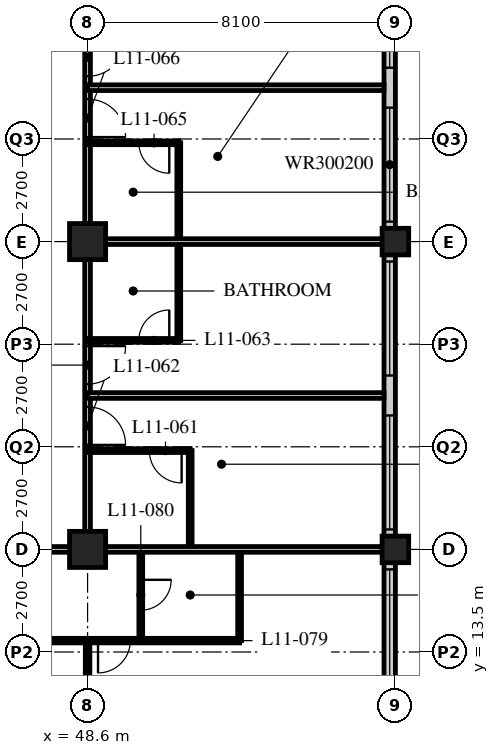
"""IFC4 building model, lengths in metres.
Left out: names, types, materials, properties, quantities, classifications, styles, units other than length and angle.
Written with IfcOpenShell. Run it as: python <this file> out.ifc"""

import sys

from ifc_helpers import new_model, si_unit, direction, frame, frame_2d, origin, origin_2d, place, context, subcontext, project, spatial, rectangle, hollow_rectangle, extrude, element, fill, save


model = new_model("IFC4")
c1 = context("Model", 3, precision=1e-05, world=origin(), true_north=direction((0.0, 1.0)))
c2 = subcontext(c1, "Body", "Model", "MODEL_VIEW")
j1 = project(units=[si_unit("LENGTHUNIT", "METRE"), si_unit("PLANEANGLEUNIT", "RADIAN")], contexts=[c1])
p1 = place(None, origin())
s1 = spatial("IfcSite", under=j1, at=p1, CompositionType="ELEMENT")
p2 = place(p1, origin())
s2 = spatial("IfcBuilding", under=s1, at=p2, CompositionType="ELEMENT")
p3 = place(p2, frame((0.0, 0.0, 50.0)))
s3 = spatial("IfcBuildingStorey", under=s2, at=p3, CompositionType="ELEMENT", Elevation=50.0)
for number, where, z_axis, x_axis in (
    (1, (48.6, 16.2, 0.0), (0.0, 0.0, 1.0), (1.0, 0.0, 0.0)),
    (2, (48.6, 24.3, 0.0), (0.0, 0.0, 1.0), (1.0, 0.0, 0.0)),
):
    element("IfcColumn", number, at=place(p3, frame(where, z_axis=z_axis, x_axis=x_axis)), inside=s3, PredefinedType="COLUMN", context=c2, shape_type="SweptSolid", body=[
        extrude(hollow_rectangle(XDim=0.95, YDim=0.95, WallThickness=0.095, at=origin_2d()), origin(), (0.0, 0.0, 1.0), 3.4),
    ])
for number, where, z_axis, x_axis in (
    (3, (56.7, 16.2, 0.0), (0.0, 0.0, 1.0), (1.0, 0.0, 0.0)),
    (4, (56.7, 24.3, 0.0), (0.0, 0.0, 1.0), (1.0, 0.0, 0.0)),
):
    element("IfcColumn", number, at=place(p3, frame(where, z_axis=z_axis, x_axis=x_axis)), inside=s3, PredefinedType="COLUMN", context=c2, shape_type="SweptSolid", body=[
        extrude(hollow_rectangle(XDim=0.7, YDim=0.7, WallThickness=0.06, at=origin_2d()), origin(), (0.0, 0.0, 1.0), 3.4),
    ])
p4 = place(p3, frame((56.55, 8.4, 0.0), z_axis=(0.0, 0.0, 1.0), x_axis=(0.0, 1.0, 0.0)))
e5 = element("IfcWall", 5, at=p4, inside=s3, PredefinedType="SOLIDWALL", context=c2, shape_type="SweptSolid", body=[
    extrude(rectangle(XDim=32.1, YDim=0.3, at=frame_2d((16.05, 0.0))), origin(), (0.0, 0.0, 1.0), 3.19),
])
p5 = place(p4, frame((0.225, 0.0, 0.9)))
e6 = element("IfcOpeningElement", 6, at=p5, cuts=e5, PredefinedType="OPENING", context=c2, shape_type="SweptSolid", body=[
    extrude(rectangle(XDim=3.0, YDim=2.0, at=frame_2d((1.5, 1.0))), frame((0.0, 0.16, 0.0), z_axis=(0.0, -1.0, 0.0), x_axis=(1.0, 0.0, 0.0)), (0.0, 0.0, 1.0), 0.32),
])
p6 = place(p4, frame((4.275, 0.0, 0.9)))
e7 = element("IfcOpeningElement", 7, at=p6, cuts=e5, PredefinedType="OPENING", context=c2, shape_type="SweptSolid", body=[
    extrude(rectangle(XDim=3.0, YDim=2.0, at=frame_2d((1.5, 1.0))), frame((0.0, 0.16, 0.0), z_axis=(0.0, -1.0, 0.0), x_axis=(1.0, 0.0, 0.0)), (0.0, 0.0, 1.0), 0.32),
])
p7 = place(p4, frame((8.325, 0.0, 0.9)))
e8 = element("IfcOpeningElement", 8, at=p7, cuts=e5, PredefinedType="OPENING", context=c2, shape_type="SweptSolid", body=[
    extrude(rectangle(XDim=3.0, YDim=2.0, at=frame_2d((1.5, 1.0))), frame((0.0, 0.16, 0.0), z_axis=(0.0, -1.0, 0.0), x_axis=(1.0, 0.0, 0.0)), (0.0, 0.0, 1.0), 0.32),
])
p8 = place(p4, frame((12.375, 0.0, 0.9)))
e9 = element("IfcOpeningElement", 9, at=p8, cuts=e5, PredefinedType="OPENING", context=c2, shape_type="SweptSolid", body=[
    extrude(rectangle(XDim=3.0, YDim=2.0, at=frame_2d((1.5, 1.0))), frame((0.0, 0.16, 0.0), z_axis=(0.0, -1.0, 0.0), x_axis=(1.0, 0.0, 0.0)), (0.0, 0.0, 1.0), 0.32),
])
p9 = place(p4, frame((16.425, 0.0, 0.9)))
e10 = element("IfcOpeningElement", 10, at=p9, cuts=e5, PredefinedType="OPENING", context=c2, shape_type="SweptSolid", body=[
    extrude(rectangle(XDim=3.0, YDim=2.0, at=frame_2d((1.5, 1.0))), frame((0.0, 0.16, 0.0), z_axis=(0.0, -1.0, 0.0), x_axis=(1.0, 0.0, 0.0)), (0.0, 0.0, 1.0), 0.32),
])
p10 = place(p4, frame((20.475, 0.0, 0.9)))
e11 = element("IfcOpeningElement", 11, at=p10, cuts=e5, PredefinedType="OPENING", context=c2, shape_type="SweptSolid", body=[
    extrude(rectangle(XDim=3.0, YDim=2.0, at=frame_2d((1.5, 1.0))), frame((0.0, 0.16, 0.0), z_axis=(0.0, -1.0, 0.0), x_axis=(1.0, 0.0, 0.0)), (0.0, 0.0, 1.0), 0.32),
])
p11 = place(p4, frame((24.525, 0.0, 0.9)))
e12 = element("IfcOpeningElement", 12, at=p11, cuts=e5, PredefinedType="OPENING", context=c2, shape_type="SweptSolid", body=[
    extrude(rectangle(XDim=3.0, YDim=2.0, at=frame_2d((1.5, 1.0))), frame((0.0, 0.16, 0.0), z_axis=(0.0, -1.0, 0.0), x_axis=(1.0, 0.0, 0.0)), (0.0, 0.0, 1.0), 0.32),
])
p12 = place(p4, frame((28.575, 0.0, 0.9)))
e13 = element("IfcOpeningElement", 13, at=p12, cuts=e5, PredefinedType="OPENING", context=c2, shape_type="SweptSolid", body=[
    extrude(rectangle(XDim=3.0, YDim=2.0, at=frame_2d((1.5, 1.0))), frame((0.0, 0.16, 0.0), z_axis=(0.0, -1.0, 0.0), x_axis=(1.0, 0.0, 0.0)), (0.0, 0.0, 1.0), 0.32),
])
p13 = place(p3, frame((8.1, 16.2, 0.0), z_axis=(0.0, 0.0, 1.0), x_axis=(1.0, 0.0, 0.0)))
e14 = element("IfcWall", 14, at=p13, inside=s3, PredefinedType="PARTITIONING", context=c2, shape_type="SweptSolid", body=[
    extrude(rectangle(XDim=40.5, YDim=0.15, at=frame_2d((20.25, 0.0))), origin(), (0.0, 0.0, 1.0), 2.578),
])
p14 = place(p13, frame((4.35, 0.0, 0.0)))
e15 = element("IfcOpeningElement", 15, at=p14, cuts=e14, PredefinedType="OPENING", context=c2, shape_type="SweptSolid", body=[
    extrude(rectangle(XDim=1.0, YDim=2.1, at=frame_2d((0.5, 1.05))), frame((0.0, 0.085, 0.0), z_axis=(0.0, -1.0, 0.0), x_axis=(1.0, 0.0, 0.0)), (0.0, 0.0, 1.0), 0.17),
])
p15 = place(p13, frame((10.85, 0.0, 0.0)))
e16 = element("IfcOpeningElement", 16, at=p15, cuts=e14, PredefinedType="OPENING", context=c2, shape_type="SweptSolid", body=[
    extrude(rectangle(XDim=1.0, YDim=2.1, at=frame_2d((0.5, 1.05))), frame((0.0, 0.085, 0.0), z_axis=(0.0, -1.0, 0.0), x_axis=(1.0, 0.0, 0.0)), (0.0, 0.0, 1.0), 0.17),
])
p16 = place(p13, frame((12.75, 0.0, 0.0)))
e17 = element("IfcOpeningElement", 17, at=p16, cuts=e14, PredefinedType="OPENING", context=c2, shape_type="SweptSolid", body=[
    extrude(rectangle(XDim=1.0, YDim=2.1, at=frame_2d((0.5, 1.05))), frame((0.0, 0.085, 0.0), z_axis=(0.0, -1.0, 0.0), x_axis=(1.0, 0.0, 0.0)), (0.0, 0.0, 1.0), 0.17),
])
p17 = place(p13, frame((18.95, 0.0, 0.0)))
e18 = element("IfcOpeningElement", 18, at=p17, cuts=e14, PredefinedType="OPENING", context=c2, shape_type="SweptSolid", body=[
    extrude(rectangle(XDim=1.0, YDim=2.1, at=frame_2d((0.5, 1.05))), frame((0.0, 0.085, 0.0), z_axis=(0.0, -1.0, 0.0), x_axis=(1.0, 0.0, 0.0)), (0.0, 0.0, 1.0), 0.17),
])
p18 = place(p13, frame((20.55, 0.0, 0.0)))
e19 = element("IfcOpeningElement", 19, at=p18, cuts=e14, PredefinedType="OPENING", context=c2, shape_type="SweptSolid", body=[
    extrude(rectangle(XDim=1.0, YDim=2.1, at=frame_2d((0.5, 1.05))), frame((0.0, 0.085, 0.0), z_axis=(0.0, -1.0, 0.0), x_axis=(1.0, 0.0, 0.0)), (0.0, 0.0, 1.0), 0.17),
])
p19 = place(p13, frame((27.05, 0.0, 0.0)))
e20 = element("IfcOpeningElement", 20, at=p19, cuts=e14, PredefinedType="OPENING", context=c2, shape_type="SweptSolid", body=[
    extrude(rectangle(XDim=1.0, YDim=2.1, at=frame_2d((0.5, 1.05))), frame((0.0, 0.085, 0.0), z_axis=(0.0, -1.0, 0.0), x_axis=(1.0, 0.0, 0.0)), (0.0, 0.0, 1.0), 0.17),
])
p20 = place(p13, frame((28.95, 0.0, 0.0)))
e21 = element("IfcOpeningElement", 21, at=p20, cuts=e14, PredefinedType="OPENING", context=c2, shape_type="SweptSolid", body=[
    extrude(rectangle(XDim=1.0, YDim=2.1, at=frame_2d((0.5, 1.05))), frame((0.0, 0.085, 0.0), z_axis=(0.0, -1.0, 0.0), x_axis=(1.0, 0.0, 0.0)), (0.0, 0.0, 1.0), 0.17),
])
p21 = place(p13, frame((34.85, 0.0, 0.0)))
e22 = element("IfcOpeningElement", 22, at=p21, cuts=e14, PredefinedType="OPENING", context=c2, shape_type="SweptSolid", body=[
    extrude(rectangle(XDim=1.0, YDim=2.1, at=frame_2d((0.5, 1.05))), frame((0.0, 0.085, 0.0), z_axis=(0.0, -1.0, 0.0), x_axis=(1.0, 0.0, 0.0)), (0.0, 0.0, 1.0), 0.17),
])
p22 = place(p13, frame((1.525, 0.0, 0.0)))
e23 = element("IfcOpeningElement", 23, at=p22, cuts=e14, PredefinedType="OPENING", context=c2, shape_type="SweptSolid", body=[
    extrude(rectangle(XDim=1.0, YDim=2.1, at=frame_2d((0.5, 1.05))), frame((0.0, 0.085, 0.0), z_axis=(0.0, -1.0, 0.0), x_axis=(1.0, 0.0, 0.0)), (0.0, 0.0, 1.0), 0.17),
])
p23 = place(p13, frame((37.975, 0.0, 0.0)))
e24 = element("IfcOpeningElement", 24, at=p23, cuts=e14, PredefinedType="OPENING", context=c2, shape_type="SweptSolid", body=[
    extrude(rectangle(XDim=1.0, YDim=2.1, at=frame_2d((0.5, 1.05))), frame((0.0, 0.085, 0.0), z_axis=(0.0, -1.0, 0.0), x_axis=(1.0, 0.0, 0.0)), (0.0, 0.0, 1.0), 0.17),
])
p24 = place(p3, frame((48.6, 16.2, 0.0), z_axis=(0.0, 0.0, 1.0), x_axis=(0.0, 1.0, 0.0)))
e25 = element("IfcWall", 25, at=p24, inside=s3, PredefinedType="PARTITIONING", context=c2, shape_type="SweptSolid", body=[
    extrude(rectangle(XDim=26.1, YDim=0.15, at=frame_2d((13.05, 0.0))), origin(), (0.0, 0.0, 1.0), 2.578),
])
p25 = place(p24, frame((2.75, 0.0, 0.0)))
e26 = element("IfcOpeningElement", 26, at=p25, cuts=e25, PredefinedType="OPENING", context=c2, shape_type="SweptSolid", body=[
    extrude(rectangle(XDim=1.0, YDim=2.1, at=frame_2d((0.5, 1.05))), frame((0.0, 0.085, 0.0), z_axis=(0.0, -1.0, 0.0), x_axis=(1.0, 0.0, 0.0)), (0.0, 0.0, 1.0), 0.17),
])
p26 = place(p24, frame((4.35, 0.0, 0.0)))
e27 = element("IfcOpeningElement", 27, at=p26, cuts=e25, PredefinedType="OPENING", context=c2, shape_type="SweptSolid", body=[
    extrude(rectangle(XDim=1.0, YDim=2.1, at=frame_2d((0.5, 1.05))), frame((0.0, 0.085, 0.0), z_axis=(0.0, -1.0, 0.0), x_axis=(1.0, 0.0, 0.0)), (0.0, 0.0, 1.0), 0.17),
])
p27 = place(p24, frame((10.85, 0.0, 0.0)))
e28 = element("IfcOpeningElement", 28, at=p27, cuts=e25, PredefinedType="OPENING", context=c2, shape_type="SweptSolid", body=[
    extrude(rectangle(XDim=1.0, YDim=2.1, at=frame_2d((0.5, 1.05))), frame((0.0, 0.085, 0.0), z_axis=(0.0, -1.0, 0.0), x_axis=(1.0, 0.0, 0.0)), (0.0, 0.0, 1.0), 0.17),
])
p28 = place(p24, frame((12.45, 0.0, 0.0)))
e29 = element("IfcOpeningElement", 29, at=p28, cuts=e25, PredefinedType="OPENING", context=c2, shape_type="SweptSolid", body=[
    extrude(rectangle(XDim=1.0, YDim=2.1, at=frame_2d((0.5, 1.05))), frame((0.0, 0.085, 0.0), z_axis=(0.0, -1.0, 0.0), x_axis=(1.0, 0.0, 0.0)), (0.0, 0.0, 1.0), 0.17),
])
p29 = place(p24, frame((18.65, 0.0, 0.0)))
e30 = element("IfcOpeningElement", 30, at=p29, cuts=e25, PredefinedType="OPENING", context=c2, shape_type="SweptSolid", body=[
    extrude(rectangle(XDim=1.0, YDim=2.1, at=frame_2d((0.5, 1.05))), frame((0.0, 0.085, 0.0), z_axis=(0.0, -1.0, 0.0), x_axis=(1.0, 0.0, 0.0)), (0.0, 0.0, 1.0), 0.17),
])
p30 = place(p24, frame((22.7, 0.0, 0.0)))
e31 = element("IfcOpeningElement", 31, at=p30, cuts=e25, PredefinedType="OPENING", context=c2, shape_type="SweptSolid", body=[
    extrude(rectangle(XDim=1.0, YDim=2.1, at=frame_2d((0.5, 1.05))), frame((0.0, 0.085, 0.0), z_axis=(0.0, -1.0, 0.0), x_axis=(1.0, 0.0, 0.0)), (0.0, 0.0, 1.0), 0.17),
])
p31 = place(p3, frame((51.3, 16.2, 0.0), z_axis=(0.0, 0.0, 1.0), x_axis=(0.0, 1.0, 0.0)))
e32 = element("IfcWall", 32, at=p31, inside=s3, PredefinedType="PARTITIONING", context=c2, shape_type="SweptSolid", body=[
    extrude(rectangle(XDim=2.6, YDim=0.1, at=frame_2d((1.3, 0.0))), origin(), (0.0, 0.0, 1.0), 3.19),
])
p32 = place(p3, frame((48.6, 18.8, 0.0), z_axis=(0.0, 0.0, 1.0), x_axis=(1.0, 0.0, 0.0)))
e33 = element("IfcWall", 33, at=p32, inside=s3, PredefinedType="PARTITIONING", context=c2, shape_type="SweptSolid", body=[
    extrude(rectangle(XDim=2.7, YDim=0.1, at=frame_2d((1.35, 0.0))), origin(), (0.0, 0.0, 1.0), 3.19),
])
p33 = place(p32, frame((1.625, 0.0, 0.0)))
e34 = element("IfcOpeningElement", 34, at=p33, cuts=e33, PredefinedType="OPENING", context=c2, shape_type="SweptSolid", body=[
    extrude(rectangle(XDim=0.85, YDim=2.1, at=frame_2d((0.425, 1.05))), frame((0.0, 0.06, 0.0), z_axis=(0.0, -1.0, 0.0), x_axis=(1.0, 0.0, 0.0)), (0.0, 0.0, 1.0), 0.12),
])
p34 = place(p3, frame((48.6, 20.25, 0.0), z_axis=(0.0, 0.0, 1.0), x_axis=(1.0, 0.0, 0.0)))
e35 = element("IfcWall", 35, at=p34, inside=s3, PredefinedType="PARTITIONING", context=c2, shape_type="SweptSolid", body=[
    extrude(rectangle(XDim=7.8, YDim=0.15, at=frame_2d((3.9, 0.0))), origin(), (0.0, 0.0, 1.0), 3.19),
])
p35 = place(p3, frame((51.0, 21.7, 0.0), z_axis=(0.0, 0.0, 1.0), x_axis=(0.0, 1.0, 0.0)))
e36 = element("IfcWall", 36, at=p35, inside=s3, PredefinedType="PARTITIONING", context=c2, shape_type="SweptSolid", body=[
    extrude(rectangle(XDim=5.2, YDim=0.1, at=frame_2d((2.6, 0.0))), origin(), (0.0, 0.0, 1.0), 3.19),
])
p36 = place(p3, frame((48.6, 21.7, 0.0), z_axis=(0.0, 0.0, 1.0), x_axis=(1.0, 0.0, 0.0)))
e37 = element("IfcWall", 37, at=p36, inside=s3, PredefinedType="PARTITIONING", context=c2, shape_type="SweptSolid", body=[
    extrude(rectangle(XDim=2.4, YDim=0.1, at=frame_2d((1.2, 0.0))), origin(), (0.0, 0.0, 1.0), 3.19),
])
p37 = place(p36, frame((1.35, 0.0, 0.0)))
e38 = element("IfcOpeningElement", 38, at=p37, cuts=e37, PredefinedType="OPENING", context=c2, shape_type="SweptSolid", body=[
    extrude(rectangle(XDim=0.8, YDim=2.1, at=frame_2d((0.4, 1.05))), frame((0.0, 0.06, 0.0), z_axis=(0.0, -1.0, 0.0), x_axis=(1.0, 0.0, 0.0)), (0.0, 0.0, 1.0), 0.12),
])
p38 = place(p3, frame((48.6, 24.3, 0.0), z_axis=(0.0, 0.0, 1.0), x_axis=(1.0, 0.0, 0.0)))
e39 = element("IfcWall", 39, at=p38, inside=s3, PredefinedType="PARTITIONING", context=c2, shape_type="SweptSolid", body=[
    extrude(rectangle(XDim=7.8, YDim=0.15, at=frame_2d((3.9, 0.0))), origin(), (0.0, 0.0, 1.0), 2.578),
])
p39 = place(p3, frame((48.6, 26.9, 0.0), z_axis=(0.0, 0.0, 1.0), x_axis=(1.0, 0.0, 0.0)))
e40 = element("IfcWall", 40, at=p39, inside=s3, PredefinedType="PARTITIONING", context=c2, shape_type="SweptSolid", body=[
    extrude(rectangle(XDim=2.4, YDim=0.1, at=frame_2d((1.2, 0.0))), origin(), (0.0, 0.0, 1.0), 3.19),
])
p40 = place(p39, frame((1.35, 0.0, 0.0)))
e41 = element("IfcOpeningElement", 41, at=p40, cuts=e40, PredefinedType="OPENING", context=c2, shape_type="SweptSolid", body=[
    extrude(rectangle(XDim=0.8, YDim=2.1, at=frame_2d((0.4, 1.05))), frame((0.0, 0.06, 0.0), z_axis=(0.0, -1.0, 0.0), x_axis=(1.0, 0.0, 0.0)), (0.0, 0.0, 1.0), 0.12),
])
p41 = place(p3, frame((48.6, 28.35, 0.0), z_axis=(0.0, 0.0, 1.0), x_axis=(1.0, 0.0, 0.0)))
e42 = element("IfcWall", 42, at=p41, inside=s3, PredefinedType="PARTITIONING", context=c2, shape_type="SweptSolid", body=[
    extrude(rectangle(XDim=7.8, YDim=0.15, at=frame_2d((3.9, 0.0))), origin(), (0.0, 0.0, 1.0), 3.19),
])
p42 = place(p3, frame((44.55, 13.8, 0.0), z_axis=(0.0, 0.0, 1.0), x_axis=(1.0, 0.0, 0.0)))
e43 = element("IfcWall", 43, at=p42, inside=s3, PredefinedType="PARTITIONING", context=c2, shape_type="SweptSolid", body=[
    extrude(rectangle(XDim=8.05, YDim=0.12, at=frame_2d((4.025, 0.0))), origin(), (0.0, 0.0, 1.0), 3.19),
])
p43 = place(p42, frame((0.475, 0.0, 0.0)))
e44 = element("IfcOpeningElement", 44, at=p43, cuts=e43, PredefinedType="OPENING", context=c2, shape_type="SweptSolid", body=[
    extrude(rectangle(XDim=0.85, YDim=2.1, at=frame_2d((0.425, 1.05))), frame((0.0, 0.07, 0.0), z_axis=(0.0, -1.0, 0.0), x_axis=(1.0, 0.0, 0.0)), (0.0, 0.0, 1.0), 0.14),
])
p44 = place(p42, frame((4.325, 0.0, 0.0)))
e45 = element("IfcOpeningElement", 45, at=p44, cuts=e43, PredefinedType="OPENING", context=c2, shape_type="SweptSolid", body=[
    extrude(rectangle(XDim=0.85, YDim=2.1, at=frame_2d((0.425, 1.05))), frame((0.0, 0.07, 0.0), z_axis=(0.0, -1.0, 0.0), x_axis=(1.0, 0.0, 0.0)), (0.0, 0.0, 1.0), 0.14),
])
p45 = place(p3, frame((50.0, 16.2, 0.0), z_axis=(0.0, 0.0, 1.0), x_axis=(0.0, -1.0, 0.0)))
e46 = element("IfcWall", 46, at=p45, inside=s3, PredefinedType="PARTITIONING", context=c2, shape_type="SweptSolid", body=[
    extrude(rectangle(XDim=2.4, YDim=0.1, at=frame_2d((1.2, 0.0))), origin(), (0.0, 0.0, 1.0), 3.19),
])
p46 = place(p45, frame((0.8, 0.0, 0.0)))
e47 = element("IfcOpeningElement", 47, at=p46, cuts=e46, PredefinedType="OPENING", context=c2, shape_type="SweptSolid", body=[
    extrude(rectangle(XDim=0.8, YDim=2.1, at=frame_2d((0.4, 1.05))), frame((0.0, 0.06, 0.0), z_axis=(0.0, -1.0, 0.0), x_axis=(1.0, 0.0, 0.0)), (0.0, 0.0, 1.0), 0.12),
])
p47 = place(p3, frame((52.6, 16.2, 0.0), z_axis=(0.0, 0.0, 1.0), x_axis=(0.0, -1.0, 0.0)))
e48 = element("IfcWall", 48, at=p47, inside=s3, PredefinedType="PARTITIONING", context=c2, shape_type="SweptSolid", body=[
    extrude(rectangle(XDim=2.4, YDim=0.1, at=frame_2d((1.2, 0.0))), origin(), (0.0, 0.0, 1.0), 3.19),
])
p48 = place(p3, frame((48.6, 13.8, 0.0), z_axis=(0.0, 0.0, 1.0), x_axis=(0.0, -1.0, 0.0)))
e49 = element("IfcWall", 49, at=p48, inside=s3, PredefinedType="PARTITIONING", context=c2, shape_type="SweptSolid", body=[
    extrude(rectangle(XDim=9.45, YDim=0.12, at=frame_2d((4.725, 0.0))), origin(), (0.0, 0.0, 1.0), 2.578),
])
p49 = place(p3, frame((48.6, 16.2, 0.0), z_axis=(0.0, 0.0, 1.0), x_axis=(1.0, 0.0, 0.0)))
e50 = element("IfcWall", 50, at=p49, inside=s3, PredefinedType="PARTITIONING", context=c2, shape_type="SweptSolid", body=[
    extrude(rectangle(XDim=7.8, YDim=0.15, at=frame_2d((3.9, 0.0))), origin(), (0.0, 0.0, 1.0), 2.578),
])
p50 = place(p6, origin())
e51 = element("IfcWindow", 51, at=p50, inside=s3, PartitioningType="SINGLE_PANEL", PredefinedType="WINDOW", context=c2, shape_type="SweptSolid", body=[
    extrude(rectangle(XDim=3.0, YDim=2.0, at=frame_2d((1.5, 1.0))), frame((0.0, 0.03, 0.0), z_axis=(0.0, -1.0, 0.0), x_axis=(1.0, 0.0, 0.0)), (0.0, 0.0, 1.0), 0.06),
])
fill(e7, e51)
p51 = place(p7, origin())
e52 = element("IfcWindow", 52, at=p51, inside=s3, PartitioningType="SINGLE_PANEL", PredefinedType="WINDOW", context=c2, shape_type="SweptSolid", body=[
    extrude(rectangle(XDim=3.0, YDim=2.0, at=frame_2d((1.5, 1.0))), frame((0.0, 0.03, 0.0), z_axis=(0.0, -1.0, 0.0), x_axis=(1.0, 0.0, 0.0)), (0.0, 0.0, 1.0), 0.06),
])
fill(e8, e52)
p52 = place(p8, origin())
e53 = element("IfcWindow", 53, at=p52, inside=s3, PartitioningType="SINGLE_PANEL", PredefinedType="WINDOW", context=c2, shape_type="SweptSolid", body=[
    extrude(rectangle(XDim=3.0, YDim=2.0, at=frame_2d((1.5, 1.0))), frame((0.0, 0.03, 0.0), z_axis=(0.0, -1.0, 0.0), x_axis=(1.0, 0.0, 0.0)), (0.0, 0.0, 1.0), 0.06),
])
fill(e9, e53)
p53 = place(p9, origin())
e54 = element("IfcWindow", 54, at=p53, inside=s3, PartitioningType="SINGLE_PANEL", PredefinedType="WINDOW", context=c2, shape_type="SweptSolid", body=[
    extrude(rectangle(XDim=3.0, YDim=2.0, at=frame_2d((1.5, 1.0))), frame((0.0, 0.03, 0.0), z_axis=(0.0, -1.0, 0.0), x_axis=(1.0, 0.0, 0.0)), (0.0, 0.0, 1.0), 0.06),
])
fill(e10, e54)
p54 = place(p10, origin())
e55 = element("IfcWindow", 55, at=p54, inside=s3, PartitioningType="SINGLE_PANEL", PredefinedType="WINDOW", context=c2, shape_type="SweptSolid", body=[
    extrude(rectangle(XDim=3.0, YDim=2.0, at=frame_2d((1.5, 1.0))), frame((0.0, 0.03, 0.0), z_axis=(0.0, -1.0, 0.0), x_axis=(1.0, 0.0, 0.0)), (0.0, 0.0, 1.0), 0.06),
])
fill(e11, e55)
p55 = place(p33, origin())
e56 = element("IfcDoor", 56, at=p55, inside=s3, OperationType="SINGLE_SWING_LEFT", PredefinedType="DOOR", context=c2, shape_type="SweptSolid", body=[
    extrude(rectangle(XDim=0.85, YDim=2.1, at=frame_2d((0.425, 1.05))), frame((0.0, 0.025, 0.0), z_axis=(0.0, -1.0, 0.0), x_axis=(1.0, 0.0, 0.0)), (0.0, 0.0, 1.0), 0.05),
])
fill(e34, e56)
p56 = place(p25, origin())
e57 = element("IfcDoor", 57, at=p56, inside=s3, OperationType="SINGLE_SWING_RIGHT", PredefinedType="DOOR", context=c2, shape_type="SweptSolid", body=[
    extrude(rectangle(XDim=1.0, YDim=2.1, at=frame_2d((0.5, 1.05))), frame((0.0, 0.025, 0.0), z_axis=(0.0, -1.0, 0.0), x_axis=(1.0, 0.0, 0.0)), (0.0, 0.0, 1.0), 0.05),
])
fill(e26, e57)
p57 = place(p37, origin())
e58 = element("IfcDoor", 58, at=p57, inside=s3, OperationType="SINGLE_SWING_RIGHT", PredefinedType="DOOR", context=c2, shape_type="SweptSolid", body=[
    extrude(rectangle(XDim=0.8, YDim=2.1, at=frame_2d((0.4, 1.05))), frame((0.0, 0.025, 0.0), z_axis=(0.0, -1.0, 0.0), x_axis=(1.0, 0.0, 0.0)), (0.0, 0.0, 1.0), 0.05),
])
fill(e38, e58)
p58 = place(p26, origin())
e59 = element("IfcDoor", 59, at=p58, inside=s3, OperationType="SINGLE_SWING_LEFT", PredefinedType="DOOR", context=c2, shape_type="SweptSolid", body=[
    extrude(rectangle(XDim=1.0, YDim=2.1, at=frame_2d((0.5, 1.05))), frame((0.0, 0.025, 0.0), z_axis=(0.0, -1.0, 0.0), x_axis=(1.0, 0.0, 0.0)), (0.0, 0.0, 1.0), 0.05),
])
fill(e27, e59)
p59 = place(p40, origin())
e60 = element("IfcDoor", 60, at=p59, inside=s3, OperationType="SINGLE_SWING_LEFT", PredefinedType="DOOR", context=c2, shape_type="SweptSolid", body=[
    extrude(rectangle(XDim=0.8, YDim=2.1, at=frame_2d((0.4, 1.05))), frame((0.0, 0.025, 0.0), z_axis=(0.0, -1.0, 0.0), x_axis=(1.0, 0.0, 0.0)), (0.0, 0.0, 1.0), 0.05),
])
fill(e41, e60)
p60 = place(p27, origin())
e61 = element("IfcDoor", 61, at=p60, inside=s3, OperationType="SINGLE_SWING_RIGHT", PredefinedType="DOOR", context=c2, shape_type="SweptSolid", body=[
    extrude(rectangle(XDim=1.0, YDim=2.1, at=frame_2d((0.5, 1.05))), frame((0.0, 0.025, 0.0), z_axis=(0.0, -1.0, 0.0), x_axis=(1.0, 0.0, 0.0)), (0.0, 0.0, 1.0), 0.05),
])
fill(e28, e61)
p61 = place(p28, origin())
e62 = element("IfcDoor", 62, at=p61, inside=s3, OperationType="SINGLE_SWING_LEFT", PredefinedType="DOOR", context=c2, shape_type="SweptSolid", body=[
    extrude(rectangle(XDim=1.0, YDim=2.1, at=frame_2d((0.5, 1.05))), frame((0.0, 0.025, 0.0), z_axis=(0.0, -1.0, 0.0), x_axis=(1.0, 0.0, 0.0)), (0.0, 0.0, 1.0), 0.05),
])
fill(e29, e62)
p62 = place(p46, origin())
e63 = element("IfcDoor", 63, at=p62, inside=s3, OperationType="SINGLE_SWING_LEFT", PredefinedType="DOOR", context=c2, shape_type="SweptSolid", body=[
    extrude(rectangle(XDim=0.8, YDim=2.1, at=frame_2d((0.4, 1.05))), frame((0.0, 0.025, 0.0), z_axis=(0.0, -1.0, 0.0), x_axis=(1.0, 0.0, 0.0)), (0.0, 0.0, 1.0), 0.05),
])
fill(e47, e63)
p63 = place(p44, origin())
e64 = element("IfcDoor", 64, at=p63, inside=s3, OperationType="SINGLE_SWING_RIGHT", PredefinedType="DOOR", context=c2, shape_type="SweptSolid", body=[
    extrude(rectangle(XDim=0.85, YDim=2.1, at=frame_2d((0.425, 1.05))), frame((0.0, 0.025, 0.0), z_axis=(0.0, -1.0, 0.0), x_axis=(1.0, 0.0, 0.0)), (0.0, 0.0, 1.0), 0.05),
])
fill(e45, e64)
save(model, sys.argv[1])
